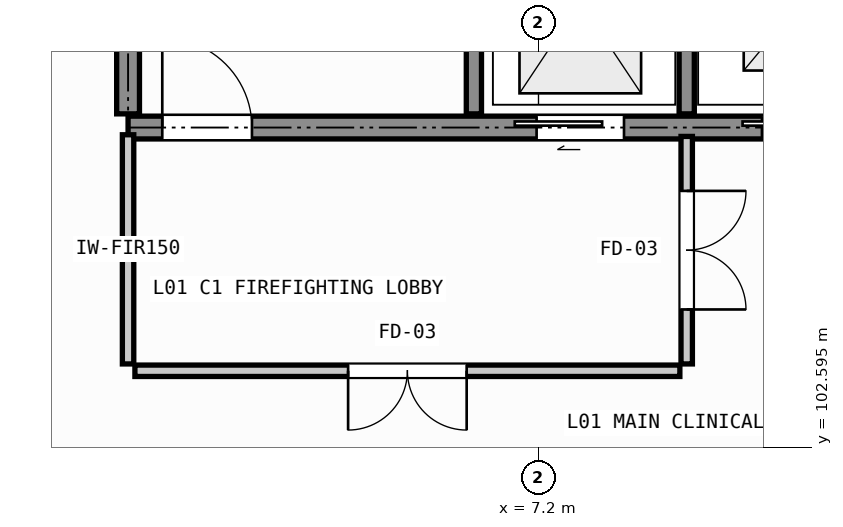
"""IFC4 building model, lengths in metres.
Left out: names, types, materials, properties, quantities, classifications, styles, units other than length and angle.
Written with IfcOpenShell. Run it as: python <this file> out.ifc"""

import sys

from ifc_helpers import new_model, si_unit, direction, frame, frame_2d, origin, place, context, subcontext, project, spatial, rectangle, extrude, element, fill, save


model = new_model("IFC4")
c1 = context("Model", 3, precision=1e-05, world=origin(), true_north=direction((0.0, 1.0)))
c2 = subcontext(c1, "Body", "Model", "MODEL_VIEW")
j1 = project(units=[si_unit("LENGTHUNIT", "METRE"), si_unit("PLANEANGLEUNIT", "RADIAN")], contexts=[c1])
p1 = place(None, origin())
s1 = spatial("IfcSite", under=j1, at=p1, CompositionType="ELEMENT")
p2 = place(p1, origin())
s2 = spatial("IfcBuilding", under=s1, at=p2, CompositionType="ELEMENT")
p3 = place(p2, origin())
s3 = spatial("IfcBuildingStorey", under=s2, at=p3, CompositionType="ELEMENT", Elevation=0.0)
p4 = place(p3, frame((1.8, 106.8, 0.0), z_axis=(0.0, 0.0, 1.0), x_axis=(1.0, 0.0, 0.0)))
e1 = element("IfcWall", 1, at=p4, inside=s3, PredefinedType="SHEAR", context=c2, shape_type="SweptSolid", body=[
    extrude(rectangle(XDim=10.8, YDim=0.3, at=frame_2d((5.4, 0.0))), origin(), (0.0, 0.0, 1.0), 4.8),
])
p5 = place(p4, frame((0.45, 0.0, 0.0)))
e2 = element("IfcOpeningElement", 2, at=p5, cuts=e1, PredefinedType="OPENING", context=c2, shape_type="SweptSolid", body=[
    extrude(rectangle(XDim=1.18, YDim=2.16, at=frame_2d((0.59, 1.08))), frame((0.0, 0.16, 0.0), z_axis=(0.0, -1.0, 0.0), x_axis=(1.0, 0.0, 0.0)), (0.0, 0.0, 1.0), 0.32),
])
p6 = place(p4, frame((5.375, 0.0, 0.0)))
e3 = element("IfcOpeningElement", 3, at=p6, cuts=e1, PredefinedType="OPENING", context=c2, shape_type="SweptSolid", body=[
    extrude(rectangle(XDim=1.15, YDim=2.15, at=frame_2d((0.575, 1.075))), frame((0.0, 0.16, 0.0), z_axis=(0.0, -1.0, 0.0), x_axis=(1.0, 0.0, 0.0)), (0.0, 0.0, 1.0), 0.32),
])
p7 = place(p4, frame((8.34, 0.0, 0.0)))
e4 = element("IfcOpeningElement", 4, at=p7, cuts=e1, PredefinedType="OPENING", context=c2, shape_type="SweptSolid", body=[
    extrude(rectangle(XDim=1.02, YDim=2.12, at=frame_2d((0.51, 1.06))), frame((0.0, 0.16, 0.0), z_axis=(0.0, -1.0, 0.0), x_axis=(1.0, 0.0, 0.0)), (0.0, 0.0, 1.0), 0.32),
])
p8 = place(p3, frame((1.8, 106.98, 0.0), z_axis=(0.0, 0.0, 1.0), x_axis=(0.0, 1.0, 0.0)))
e5 = element("IfcWall", 5, at=p8, inside=s3, PredefinedType="SHEAR", context=c2, shape_type="SweptSolid", body=[
    extrude(rectangle(XDim=6.24, YDim=0.3, at=frame_2d((3.12, 0.0))), origin(), (0.0, 0.0, 1.0), 4.8),
])
for number, where, z_axis, x_axis in (
    (6, (6.35, 106.98, 0.0), (0.0, 0.0, 1.0), (0.0, 1.0, 0.0)),
    (7, (9.15, 106.98, 0.0), (0.0, 0.0, 1.0), (0.0, 1.0, 0.0)),
):
    element("IfcWall", number, at=place(p3, frame(where, z_axis=z_axis, x_axis=x_axis)), inside=s3, PredefinedType="SHEAR", context=c2, shape_type="SweptSolid", body=[
        extrude(rectangle(XDim=3.15, YDim=0.2, at=frame_2d((1.575, 0.0))), origin(), (0.0, 0.0, 1.0), 4.8),
    ])
p9 = place(p3, frame((1.8, 103.69, 0.0), z_axis=(0.0, 0.0, 1.0), x_axis=(0.0, 1.0, 0.0)))
e8 = element("IfcWall", 8, at=p9, inside=s3, PredefinedType="PARTITIONING", context=c2, shape_type="SweptSolid", body=[
    extrude(rectangle(XDim=3.015, YDim=0.15, at=frame_2d((1.508, 0.0))), origin(), (0.0, 0.0, 1.0), 4.57),
])
p10 = place(p3, frame((9.15, 106.683, 0.0), z_axis=(0.0, 0.0, 1.0), x_axis=(0.0, -1.0, 0.0)))
e9 = element("IfcWall", 9, at=p10, inside=s3, PredefinedType="PARTITIONING", context=c2, shape_type="SweptSolid", body=[
    extrude(rectangle(XDim=2.993, YDim=0.15, at=frame_2d((1.497, 0.0))), origin(), (0.0, 0.0, 1.0), 4.57),
])
p11 = place(p10, frame((0.717, 0.0, 0.0)))
e10 = element("IfcOpeningElement", 10, at=p11, cuts=e9, PredefinedType="OPENING", context=c2, shape_type="SweptSolid", body=[
    extrude(rectangle(XDim=1.56, YDim=2.22, at=frame_2d((0.78, 1.11))), frame((0.0, 0.085, 0.0), z_axis=(0.0, -1.0, 0.0), x_axis=(1.0, 0.0, 0.0)), (0.0, 0.0, 1.0), 0.17),
])
p12 = place(p3, frame((9.06, 103.6, 0.0), z_axis=(0.0, 0.0, 1.0), x_axis=(-1.0, 0.0, 0.0)))
e11 = element("IfcWall", 11, at=p12, inside=s3, PredefinedType="PARTITIONING", context=c2, shape_type="SweptSolid", body=[
    extrude(rectangle(XDim=7.17, YDim=0.15, at=frame_2d((3.585, 0.0))), origin(), (0.0, 0.0, 1.0), 4.57),
])
p13 = place(p12, frame((2.805, 0.0, 0.0)))
e12 = element("IfcOpeningElement", 12, at=p13, cuts=e11, PredefinedType="OPENING", context=c2, shape_type="SweptSolid", body=[
    extrude(rectangle(XDim=1.56, YDim=2.22, at=frame_2d((0.78, 1.11))), frame((0.0, 0.085, 0.0), z_axis=(0.0, -1.0, 0.0), x_axis=(1.0, 0.0, 0.0)), (0.0, 0.0, 1.0), 0.17),
])
p14 = place(p5, origin())
e13 = element("IfcDoor", 13, at=p14, inside=s3, OperationType="SINGLE_SWING_LEFT", PredefinedType="DOOR", context=c2, shape_type="SweptSolid", body=[
    extrude(rectangle(XDim=1.18, YDim=2.16, at=frame_2d((0.59, 1.08))), frame((0.0, 0.025, 0.0), z_axis=(0.0, -1.0, 0.0), x_axis=(1.0, 0.0, 0.0)), (0.0, 0.0, 1.0), 0.05),
])
fill(e2, e13)
p15 = place(p6, origin())
e14 = element("IfcDoor", 14, at=p15, inside=s3, OperationType="DOUBLE_DOOR_SLIDING", PredefinedType="DOOR", context=c2, shape_type="SweptSolid", body=[
    extrude(rectangle(XDim=1.15, YDim=2.15, at=frame_2d((0.575, 1.075))), frame((0.0, 0.025, 0.0), z_axis=(0.0, -1.0, 0.0), x_axis=(1.0, 0.0, 0.0)), (0.0, 0.0, 1.0), 0.05),
])
fill(e3, e14)
p16 = place(p7, origin())
e15 = element("IfcDoor", 15, at=p16, inside=s3, OperationType="SLIDING_TO_LEFT", PredefinedType="DOOR", context=c2, shape_type="SweptSolid", body=[
    extrude(rectangle(XDim=1.02, YDim=2.12, at=frame_2d((0.51, 1.06))), frame((0.0, 0.025, 0.0), z_axis=(0.0, -1.0, 0.0), x_axis=(1.0, 0.0, 0.0)), (0.0, 0.0, 1.0), 0.05),
])
fill(e4, e15)
p17 = place(p11, origin())
e16 = element("IfcDoor", 16, at=p17, inside=s3, OperationType="DOUBLE_DOOR_SINGLE_SWING", PredefinedType="DOOR", context=c2, shape_type="SweptSolid", body=[
    extrude(rectangle(XDim=1.56, YDim=2.22, at=frame_2d((0.78, 1.11))), frame((0.0, 0.025, 0.0), z_axis=(0.0, -1.0, 0.0), x_axis=(1.0, 0.0, 0.0)), (0.0, 0.0, 1.0), 0.05),
])
fill(e10, e16)
p18 = place(p13, origin())
e17 = element("IfcDoor", 17, at=p18, inside=s3, OperationType="DOUBLE_DOOR_SINGLE_SWING", PredefinedType="DOOR", context=c2, shape_type="SweptSolid", body=[
    extrude(rectangle(XDim=1.56, YDim=2.22, at=frame_2d((0.78, 1.11))), frame((0.0, 0.025, 0.0), z_axis=(0.0, -1.0, 0.0), x_axis=(1.0, 0.0, 0.0)), (0.0, 0.0, 1.0), 0.05),
])
fill(e12, e17)
save(model, sys.argv[1])
